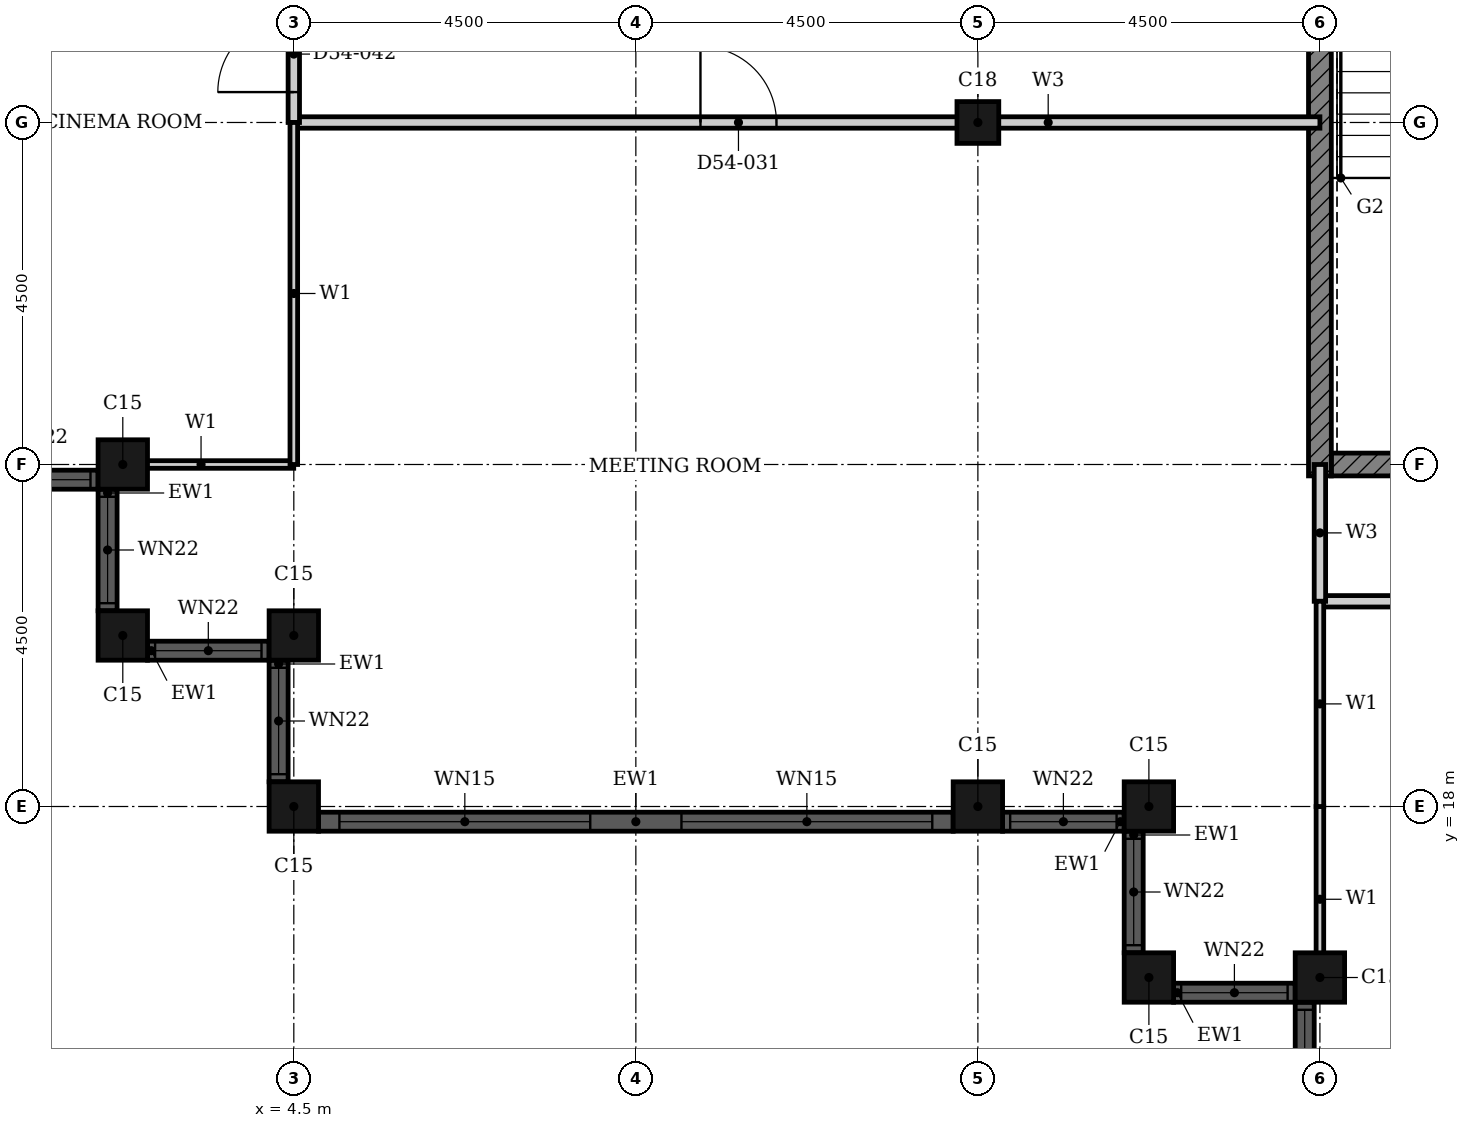
"""IFC4 building model, lengths in metres.
Left out: names, types, materials, properties, quantities, classifications, styles, units other than length and angle.
Written with IfcOpenShell. Run it as: python <this file> out.ifc"""

import sys

from ifc_helpers import new_model, si_unit, direction, frame, frame_2d, origin, origin_2d, place, context, subcontext, project, spatial, rectangle, hollow_rectangle, extrude, element, fill, save


model = new_model("IFC4")
c1 = context("Model", 3, precision=1e-05, world=origin(), true_north=direction((0.0, 1.0)))
c2 = subcontext(c1, "Body", "Model", "MODEL_VIEW")
j1 = project(units=[si_unit("LENGTHUNIT", "METRE"), si_unit("PLANEANGLEUNIT", "RADIAN")], contexts=[c1])
p1 = place(None, origin())
s1 = spatial("IfcSite", under=j1, at=p1, CompositionType="ELEMENT")
p2 = place(p1, origin())
s2 = spatial("IfcBuilding", under=s1, at=p2, CompositionType="ELEMENT")
p3 = place(p2, frame((0.0, 0.0, 214.6)))
s3 = spatial("IfcBuildingStorey", under=s2, at=p3, CompositionType="ELEMENT", Elevation=214.6)
for number, where, z_axis, x_axis in (
    (1, (2.25, 22.5, 0.0), (0.0, 0.0, 1.0), (1.0, 0.0, 0.0)),
    (2, (2.25, 20.25, 0.0), (0.0, 0.0, 1.0), (1.0, 0.0, 0.0)),
    (3, (4.5, 20.25, 0.0), (0.0, 0.0, 1.0), (1.0, 0.0, 0.0)),
    (4, (4.5, 18.0, 0.0), (0.0, 0.0, 1.0), (1.0, 0.0, 0.0)),
    (5, (13.5, 18.0, 0.0), (0.0, 0.0, 1.0), (1.0, 0.0, 0.0)),
    (6, (15.75, 18.0, 0.0), (0.0, 0.0, 1.0), (1.0, 0.0, 0.0)),
    (7, (15.75, 15.75, 0.0), (0.0, 0.0, 1.0), (1.0, 0.0, 0.0)),
    (8, (18.0, 15.75, 0.0), (0.0, 0.0, 1.0), (1.0, 0.0, 0.0)),
):
    element("IfcColumn", number, at=place(p3, frame(where, z_axis=z_axis, x_axis=x_axis)), inside=s3, PredefinedType="COLUMN", context=c2, shape_type="SweptSolid", body=[
        extrude(hollow_rectangle(XDim=0.65, YDim=0.65, WallThickness=0.021, at=origin_2d()), origin(), (0.0, 0.0, 1.0), 3.7),
    ])
p4 = place(p3, frame((13.5, 27.0, 0.0), z_axis=(0.0, 0.0, 1.0), x_axis=(1.0, 0.0, 0.0)))
e9 = element("IfcColumn", 9, at=p4, inside=s3, PredefinedType="COLUMN", context=c2, shape_type="SweptSolid", body=[
    extrude(hollow_rectangle(XDim=0.55, YDim=0.55, WallThickness=0.018, at=origin_2d()), origin(), (0.0, 0.0, 1.0), 3.7),
])
p5 = place(p3, frame((0.325, 22.3, 0.0), z_axis=(0.0, 0.0, 1.0), x_axis=(1.0, 0.0, 0.0)))
e10 = element("IfcWall", 10, at=p5, inside=s3, PredefinedType="SOLIDWALL", context=c2, shape_type="SweptSolid", body=[
    extrude(rectangle(XDim=1.6, YDim=0.25, at=frame_2d((0.8, 0.0))), origin(), (0.0, 0.0, 1.0), 3.7),
])
p6 = place(p5, frame((0.1, 0.0, 0.9)))
e11 = element("IfcOpeningElement", 11, at=p6, cuts=e10, PredefinedType="OPENING", context=c2, shape_type="SweptSolid", body=[
    extrude(rectangle(XDim=1.4, YDim=1.85, at=frame_2d((0.7, 0.925))), frame((0.0, 0.135, 0.0), z_axis=(0.0, -1.0, 0.0), x_axis=(1.0, 0.0, 0.0)), (0.0, 0.0, 1.0), 0.27),
])
p7 = place(p3, frame((2.05, 22.175, 0.0), z_axis=(0.0, 0.0, 1.0), x_axis=(0.0, -1.0, 0.0)))
e12 = element("IfcWall", 12, at=p7, inside=s3, PredefinedType="SOLIDWALL", context=c2, shape_type="SweptSolid", body=[
    extrude(rectangle(XDim=1.6, YDim=0.25, at=frame_2d((0.8, 0.0))), origin(), (0.0, 0.0, 1.0), 3.7),
])
p8 = place(p7, frame((0.1, 0.0, 0.9)))
e13 = element("IfcOpeningElement", 13, at=p8, cuts=e12, PredefinedType="OPENING", context=c2, shape_type="SweptSolid", body=[
    extrude(rectangle(XDim=1.4, YDim=1.85, at=frame_2d((0.7, 0.925))), frame((0.0, 0.135, 0.0), z_axis=(0.0, -1.0, 0.0), x_axis=(1.0, 0.0, 0.0)), (0.0, 0.0, 1.0), 0.27),
])
p9 = place(p3, frame((2.575, 20.05, 0.0), z_axis=(0.0, 0.0, 1.0), x_axis=(1.0, 0.0, 0.0)))
e14 = element("IfcWall", 14, at=p9, inside=s3, PredefinedType="SOLIDWALL", context=c2, shape_type="SweptSolid", body=[
    extrude(rectangle(XDim=1.6, YDim=0.25, at=frame_2d((0.8, 0.0))), origin(), (0.0, 0.0, 1.0), 3.7),
])
p10 = place(p9, frame((0.1, 0.0, 0.9)))
e15 = element("IfcOpeningElement", 15, at=p10, cuts=e14, PredefinedType="OPENING", context=c2, shape_type="SweptSolid", body=[
    extrude(rectangle(XDim=1.4, YDim=1.85, at=frame_2d((0.7, 0.925))), frame((0.0, 0.135, 0.0), z_axis=(0.0, -1.0, 0.0), x_axis=(1.0, 0.0, 0.0)), (0.0, 0.0, 1.0), 0.27),
])
p11 = place(p3, frame((4.3, 19.925, 0.0), z_axis=(0.0, 0.0, 1.0), x_axis=(0.0, -1.0, 0.0)))
e16 = element("IfcWall", 16, at=p11, inside=s3, PredefinedType="SOLIDWALL", context=c2, shape_type="SweptSolid", body=[
    extrude(rectangle(XDim=1.6, YDim=0.25, at=frame_2d((0.8, 0.0))), origin(), (0.0, 0.0, 1.0), 3.7),
])
p12 = place(p11, frame((0.1, 0.0, 0.9)))
e17 = element("IfcOpeningElement", 17, at=p12, cuts=e16, PredefinedType="OPENING", context=c2, shape_type="SweptSolid", body=[
    extrude(rectangle(XDim=1.4, YDim=1.85, at=frame_2d((0.7, 0.925))), frame((0.0, 0.135, 0.0), z_axis=(0.0, -1.0, 0.0), x_axis=(1.0, 0.0, 0.0)), (0.0, 0.0, 1.0), 0.27),
])
p13 = place(p3, frame((4.825, 17.8, 0.0), z_axis=(0.0, 0.0, 1.0), x_axis=(1.0, 0.0, 0.0)))
e18 = element("IfcWall", 18, at=p13, inside=s3, PredefinedType="SOLIDWALL", context=c2, shape_type="SweptSolid", body=[
    extrude(rectangle(XDim=8.35, YDim=0.25, at=frame_2d((4.175, 0.0))), origin(), (0.0, 0.0, 1.0), 3.7),
])
p14 = place(p13, frame((0.275, 0.0, 0.45)))
e19 = element("IfcOpeningElement", 19, at=p14, cuts=e18, PredefinedType="OPENING", context=c2, shape_type="SweptSolid", body=[
    extrude(rectangle(XDim=3.3, YDim=2.3, at=frame_2d((1.65, 1.15))), frame((0.0, 0.135, 0.0), z_axis=(0.0, -1.0, 0.0), x_axis=(1.0, 0.0, 0.0)), (0.0, 0.0, 1.0), 0.27),
])
p15 = place(p13, frame((4.775, 0.0, 0.45)))
e20 = element("IfcOpeningElement", 20, at=p15, cuts=e18, PredefinedType="OPENING", context=c2, shape_type="SweptSolid", body=[
    extrude(rectangle(XDim=3.3, YDim=2.3, at=frame_2d((1.65, 1.15))), frame((0.0, 0.135, 0.0), z_axis=(0.0, -1.0, 0.0), x_axis=(1.0, 0.0, 0.0)), (0.0, 0.0, 1.0), 0.27),
])
p16 = place(p3, frame((13.825, 17.8, 0.0), z_axis=(0.0, 0.0, 1.0), x_axis=(1.0, 0.0, 0.0)))
e21 = element("IfcWall", 21, at=p16, inside=s3, PredefinedType="SOLIDWALL", context=c2, shape_type="SweptSolid", body=[
    extrude(rectangle(XDim=1.6, YDim=0.25, at=frame_2d((0.8, 0.0))), origin(), (0.0, 0.0, 1.0), 3.7),
])
p17 = place(p16, frame((0.1, 0.0, 0.9)))
e22 = element("IfcOpeningElement", 22, at=p17, cuts=e21, PredefinedType="OPENING", context=c2, shape_type="SweptSolid", body=[
    extrude(rectangle(XDim=1.4, YDim=1.85, at=frame_2d((0.7, 0.925))), frame((0.0, 0.135, 0.0), z_axis=(0.0, -1.0, 0.0), x_axis=(1.0, 0.0, 0.0)), (0.0, 0.0, 1.0), 0.27),
])
p18 = place(p3, frame((15.55, 17.675, 0.0), z_axis=(0.0, 0.0, 1.0), x_axis=(0.0, -1.0, 0.0)))
e23 = element("IfcWall", 23, at=p18, inside=s3, PredefinedType="SOLIDWALL", context=c2, shape_type="SweptSolid", body=[
    extrude(rectangle(XDim=1.6, YDim=0.25, at=frame_2d((0.8, 0.0))), origin(), (0.0, 0.0, 1.0), 3.7),
])
p19 = place(p18, frame((0.1, 0.0, 0.9)))
e24 = element("IfcOpeningElement", 24, at=p19, cuts=e23, PredefinedType="OPENING", context=c2, shape_type="SweptSolid", body=[
    extrude(rectangle(XDim=1.4, YDim=1.85, at=frame_2d((0.7, 0.925))), frame((0.0, 0.135, 0.0), z_axis=(0.0, -1.0, 0.0), x_axis=(1.0, 0.0, 0.0)), (0.0, 0.0, 1.0), 0.27),
])
p20 = place(p3, frame((16.075, 15.55, 0.0), z_axis=(0.0, 0.0, 1.0), x_axis=(1.0, 0.0, 0.0)))
e25 = element("IfcWall", 25, at=p20, inside=s3, PredefinedType="SOLIDWALL", context=c2, shape_type="SweptSolid", body=[
    extrude(rectangle(XDim=1.6, YDim=0.25, at=frame_2d((0.8, 0.0))), origin(), (0.0, 0.0, 1.0), 3.7),
])
p21 = place(p20, frame((0.1, 0.0, 0.9)))
e26 = element("IfcOpeningElement", 26, at=p21, cuts=e25, PredefinedType="OPENING", context=c2, shape_type="SweptSolid", body=[
    extrude(rectangle(XDim=1.4, YDim=1.85, at=frame_2d((0.7, 0.925))), frame((0.0, 0.135, 0.0), z_axis=(0.0, -1.0, 0.0), x_axis=(1.0, 0.0, 0.0)), (0.0, 0.0, 1.0), 0.27),
])
p22 = place(p3, frame((17.8, 15.425, 0.0), z_axis=(0.0, 0.0, 1.0), x_axis=(0.0, -1.0, 0.0)))
e27 = element("IfcWall", 27, at=p22, inside=s3, PredefinedType="SOLIDWALL", context=c2, shape_type="SweptSolid", body=[
    extrude(rectangle(XDim=1.6, YDim=0.25, at=frame_2d((0.8, 0.0))), origin(), (0.0, 0.0, 1.0), 3.7),
])
p23 = place(p22, frame((0.1, 0.0, 0.9)))
e28 = element("IfcOpeningElement", 28, at=p23, cuts=e27, PredefinedType="OPENING", context=c2, shape_type="SweptSolid", body=[
    extrude(rectangle(XDim=1.4, YDim=1.85, at=frame_2d((0.7, 0.925))), frame((0.0, 0.135, 0.0), z_axis=(0.0, -1.0, 0.0), x_axis=(1.0, 0.0, 0.0)), (0.0, 0.0, 1.0), 0.27),
])
p24 = place(p3, frame((18.15, 22.5, 0.0), z_axis=(0.0, 0.0, 1.0), x_axis=(1.0, 0.0, 0.0)))
e29 = element("IfcWall", 29, at=p24, inside=s3, PredefinedType="SHEAR", context=c2, shape_type="SweptSolid", body=[
    extrude(rectangle(XDim=4.225, YDim=0.3, at=frame_2d((2.113, 0.0))), origin(), (0.0, 0.0, 1.0), 3.4),
])
p25 = place(p3, frame((18.0, 22.35, 0.0), z_axis=(0.0, 0.0, 1.0), x_axis=(0.0, 1.0, 0.0)))
e30 = element("IfcWall", 30, at=p25, inside=s3, PredefinedType="SHEAR", context=c2, shape_type="SweptSolid", body=[
    extrude(rectangle(XDim=9.3, YDim=0.3, at=frame_2d((4.65, 0.0))), origin(), (0.0, 0.0, 1.0), 3.4),
])
p26 = place(p3, frame((18.0, 20.7, 0.0), z_axis=(0.0, 0.0, 1.0), x_axis=(1.0, 0.0, 0.0)))
e31 = element("IfcWall", 31, at=p26, inside=s3, PredefinedType="PARTITIONING", context=c2, shape_type="SweptSolid", body=[
    extrude(rectangle(XDim=13.5, YDim=0.15, at=frame_2d((6.75, 0.0))), origin(), (0.0, 0.0, 1.0), 3.4),
])
p27 = place(p26, frame((6.25, 0.0, 0.0)))
e32 = element("IfcOpeningElement", 32, at=p27, cuts=e31, PredefinedType="OPENING", context=c2, shape_type="SweptSolid", body=[
    extrude(rectangle(XDim=1.0, YDim=2.1, at=frame_2d((0.5, 1.05))), frame((0.0, 0.085, 0.0), z_axis=(0.0, -1.0, 0.0), x_axis=(1.0, 0.0, 0.0)), (0.0, 0.0, 1.0), 0.17),
])
p28 = place(p3, frame((4.5, 27.0, 0.0), z_axis=(0.0, 0.0, 1.0), x_axis=(1.0, 0.0, 0.0)))
e33 = element("IfcWall", 33, at=p28, inside=s3, PredefinedType="PARTITIONING", context=c2, shape_type="SweptSolid", body=[
    extrude(rectangle(XDim=13.5, YDim=0.15, at=frame_2d((6.75, 0.0))), origin(), (0.0, 0.0, 1.0), 2.68),
])
p29 = place(p28, frame((5.35, 0.0, 0.0)))
e34 = element("IfcOpeningElement", 34, at=p29, cuts=e33, PredefinedType="OPENING", context=c2, shape_type="SweptSolid", body=[
    extrude(rectangle(XDim=1.0, YDim=2.1, at=frame_2d((0.5, 1.05))), frame((0.0, 0.085, 0.0), z_axis=(0.0, -1.0, 0.0), x_axis=(1.0, 0.0, 0.0)), (0.0, 0.0, 1.0), 0.17),
])
p30 = place(p3, frame((18.0, 20.7, 0.0), z_axis=(0.0, 0.0, 1.0), x_axis=(0.0, 1.0, 0.0)))
e35 = element("IfcWall", 35, at=p30, inside=s3, PredefinedType="PARTITIONING", context=c2, shape_type="SweptSolid", body=[
    extrude(rectangle(XDim=1.8, YDim=0.15, at=frame_2d((0.9, 0.0))), origin(), (0.0, 0.0, 1.0), 3.4),
])
p31 = place(p3, frame((4.5, 27.0, 0.0), z_axis=(0.0, 0.0, 1.0), x_axis=(0.0, 1.0, 0.0)))
e36 = element("IfcWall", 36, at=p31, inside=s3, PredefinedType="PARTITIONING", context=c2, shape_type="SweptSolid", body=[
    extrude(rectangle(XDim=1.8, YDim=0.15, at=frame_2d((0.9, 0.0))), origin(), (0.0, 0.0, 1.0), 3.4),
])
p32 = place(p31, frame((0.4, 0.0, 0.0)))
e37 = element("IfcOpeningElement", 37, at=p32, cuts=e36, PredefinedType="OPENING", context=c2, shape_type="SweptSolid", body=[
    extrude(rectangle(XDim=1.0, YDim=2.1, at=frame_2d((0.5, 1.05))), frame((0.0, 0.085, 0.0), z_axis=(0.0, -1.0, 0.0), x_axis=(1.0, 0.0, 0.0)), (0.0, 0.0, 1.0), 0.17),
])
p33 = place(p3, frame((2.06, 22.5, 0.0), z_axis=(0.0, 0.0, 1.0), x_axis=(1.0, 0.0, 0.0)))
e38 = element("IfcWall", 38, at=p33, inside=s3, PredefinedType="PARTITIONING", context=c2, shape_type="SweptSolid", body=[
    extrude(rectangle(XDim=2.439, YDim=0.1, at=frame_2d((1.219, 0.0))), origin(), (0.0, 0.0, 1.0), 2.68),
])
p34 = place(p3, frame((18.0, 15.56, 0.0), z_axis=(0.0, 0.0, 1.0), x_axis=(0.0, 1.0, 0.0)))
e39 = element("IfcWall", 39, at=p34, inside=s3, PredefinedType="PARTITIONING", context=c2, shape_type="SweptSolid", body=[
    extrude(rectangle(XDim=2.439, YDim=0.1, at=frame_2d((1.219, 0.0))), origin(), (0.0, 0.0, 1.0), 3.4),
])
p35 = place(p3, frame((18.0, 18.0, 0.0), z_axis=(0.0, 0.0, 1.0), x_axis=(0.0, 1.0, 0.0)))
e40 = element("IfcWall", 40, at=p35, inside=s3, PredefinedType="PARTITIONING", context=c2, shape_type="SweptSolid", body=[
    extrude(rectangle(XDim=2.7, YDim=0.1, at=frame_2d((1.35, 0.0))), origin(), (0.0, 0.0, 1.0), 3.4),
])
p36 = place(p3, frame((4.5, 22.5, 0.0), z_axis=(0.0, 0.0, 1.0), x_axis=(0.0, 1.0, 0.0)))
e41 = element("IfcWall", 41, at=p36, inside=s3, PredefinedType="PARTITIONING", context=c2, shape_type="SweptSolid", body=[
    extrude(rectangle(XDim=4.5, YDim=0.1, at=frame_2d((2.25, 0.0))), origin(), (0.0, 0.0, 1.0), 3.4),
])
p37 = place(p6, origin())
e42 = element("IfcWindow", 42, at=p37, inside=s3, PartitioningType="SINGLE_PANEL", PredefinedType="WINDOW", context=c2, shape_type="SweptSolid", body=[
    extrude(rectangle(XDim=1.4, YDim=1.85, at=frame_2d((0.7, 0.925))), frame((0.0, 0.03, 0.0), z_axis=(0.0, -1.0, 0.0), x_axis=(1.0, 0.0, 0.0)), (0.0, 0.0, 1.0), 0.06),
])
fill(e11, e42)
p38 = place(p8, origin())
e43 = element("IfcWindow", 43, at=p38, inside=s3, PartitioningType="SINGLE_PANEL", PredefinedType="WINDOW", context=c2, shape_type="SweptSolid", body=[
    extrude(rectangle(XDim=1.4, YDim=1.85, at=frame_2d((0.7, 0.925))), frame((0.0, 0.03, 0.0), z_axis=(0.0, -1.0, 0.0), x_axis=(1.0, 0.0, 0.0)), (0.0, 0.0, 1.0), 0.06),
])
fill(e13, e43)
p39 = place(p10, origin())
e44 = element("IfcWindow", 44, at=p39, inside=s3, PartitioningType="SINGLE_PANEL", PredefinedType="WINDOW", context=c2, shape_type="SweptSolid", body=[
    extrude(rectangle(XDim=1.4, YDim=1.85, at=frame_2d((0.7, 0.925))), frame((0.0, 0.03, 0.0), z_axis=(0.0, -1.0, 0.0), x_axis=(1.0, 0.0, 0.0)), (0.0, 0.0, 1.0), 0.06),
])
fill(e15, e44)
p40 = place(p12, origin())
e45 = element("IfcWindow", 45, at=p40, inside=s3, PartitioningType="SINGLE_PANEL", PredefinedType="WINDOW", context=c2, shape_type="SweptSolid", body=[
    extrude(rectangle(XDim=1.4, YDim=1.85, at=frame_2d((0.7, 0.925))), frame((0.0, 0.03, 0.0), z_axis=(0.0, -1.0, 0.0), x_axis=(1.0, 0.0, 0.0)), (0.0, 0.0, 1.0), 0.06),
])
fill(e17, e45)
p41 = place(p14, origin())
e46 = element("IfcWindow", 46, at=p41, inside=s3, PartitioningType="SINGLE_PANEL", PredefinedType="WINDOW", context=c2, shape_type="SweptSolid", body=[
    extrude(rectangle(XDim=3.3, YDim=2.3, at=frame_2d((1.65, 1.15))), frame((0.0, 0.03, 0.0), z_axis=(0.0, -1.0, 0.0), x_axis=(1.0, 0.0, 0.0)), (0.0, 0.0, 1.0), 0.06),
])
fill(e19, e46)
p42 = place(p15, origin())
e47 = element("IfcWindow", 47, at=p42, inside=s3, PartitioningType="SINGLE_PANEL", PredefinedType="WINDOW", context=c2, shape_type="SweptSolid", body=[
    extrude(rectangle(XDim=3.3, YDim=2.3, at=frame_2d((1.65, 1.15))), frame((0.0, 0.03, 0.0), z_axis=(0.0, -1.0, 0.0), x_axis=(1.0, 0.0, 0.0)), (0.0, 0.0, 1.0), 0.06),
])
fill(e20, e47)
p43 = place(p17, origin())
e48 = element("IfcWindow", 48, at=p43, inside=s3, PartitioningType="SINGLE_PANEL", PredefinedType="WINDOW", context=c2, shape_type="SweptSolid", body=[
    extrude(rectangle(XDim=1.4, YDim=1.85, at=frame_2d((0.7, 0.925))), frame((0.0, 0.03, 0.0), z_axis=(0.0, -1.0, 0.0), x_axis=(1.0, 0.0, 0.0)), (0.0, 0.0, 1.0), 0.06),
])
fill(e22, e48)
p44 = place(p19, origin())
e49 = element("IfcWindow", 49, at=p44, inside=s3, PartitioningType="SINGLE_PANEL", PredefinedType="WINDOW", context=c2, shape_type="SweptSolid", body=[
    extrude(rectangle(XDim=1.4, YDim=1.85, at=frame_2d((0.7, 0.925))), frame((0.0, 0.03, 0.0), z_axis=(0.0, -1.0, 0.0), x_axis=(1.0, 0.0, 0.0)), (0.0, 0.0, 1.0), 0.06),
])
fill(e24, e49)
p45 = place(p21, origin())
e50 = element("IfcWindow", 50, at=p45, inside=s3, PartitioningType="SINGLE_PANEL", PredefinedType="WINDOW", context=c2, shape_type="SweptSolid", body=[
    extrude(rectangle(XDim=1.4, YDim=1.85, at=frame_2d((0.7, 0.925))), frame((0.0, 0.03, 0.0), z_axis=(0.0, -1.0, 0.0), x_axis=(1.0, 0.0, 0.0)), (0.0, 0.0, 1.0), 0.06),
])
fill(e26, e50)
p46 = place(p23, origin())
e51 = element("IfcWindow", 51, at=p46, inside=s3, PartitioningType="SINGLE_PANEL", PredefinedType="WINDOW", context=c2, shape_type="SweptSolid", body=[
    extrude(rectangle(XDim=1.4, YDim=1.85, at=frame_2d((0.7, 0.925))), frame((0.0, 0.03, 0.0), z_axis=(0.0, -1.0, 0.0), x_axis=(1.0, 0.0, 0.0)), (0.0, 0.0, 1.0), 0.06),
])
fill(e28, e51)
p47 = place(p29, origin())
e52 = element("IfcDoor", 52, at=p47, inside=s3, OperationType="SINGLE_SWING_LEFT", PredefinedType="DOOR", context=c2, shape_type="SweptSolid", body=[
    extrude(rectangle(XDim=1.0, YDim=2.1, at=frame_2d((0.5, 1.05))), frame((0.0, 0.025, 0.0), z_axis=(0.0, -1.0, 0.0), x_axis=(1.0, 0.0, 0.0)), (0.0, 0.0, 1.0), 0.05),
])
fill(e34, e52)
p48 = place(p32, origin())
e53 = element("IfcDoor", 53, at=p48, inside=s3, OperationType="SINGLE_SWING_LEFT", PredefinedType="DOOR", context=c2, shape_type="SweptSolid", body=[
    extrude(rectangle(XDim=1.0, YDim=2.1, at=frame_2d((0.5, 1.05))), frame((0.0, 0.025, 0.0), z_axis=(0.0, -1.0, 0.0), x_axis=(1.0, 0.0, 0.0)), (0.0, 0.0, 1.0), 0.05),
])
fill(e37, e53)
save(model, sys.argv[1])
